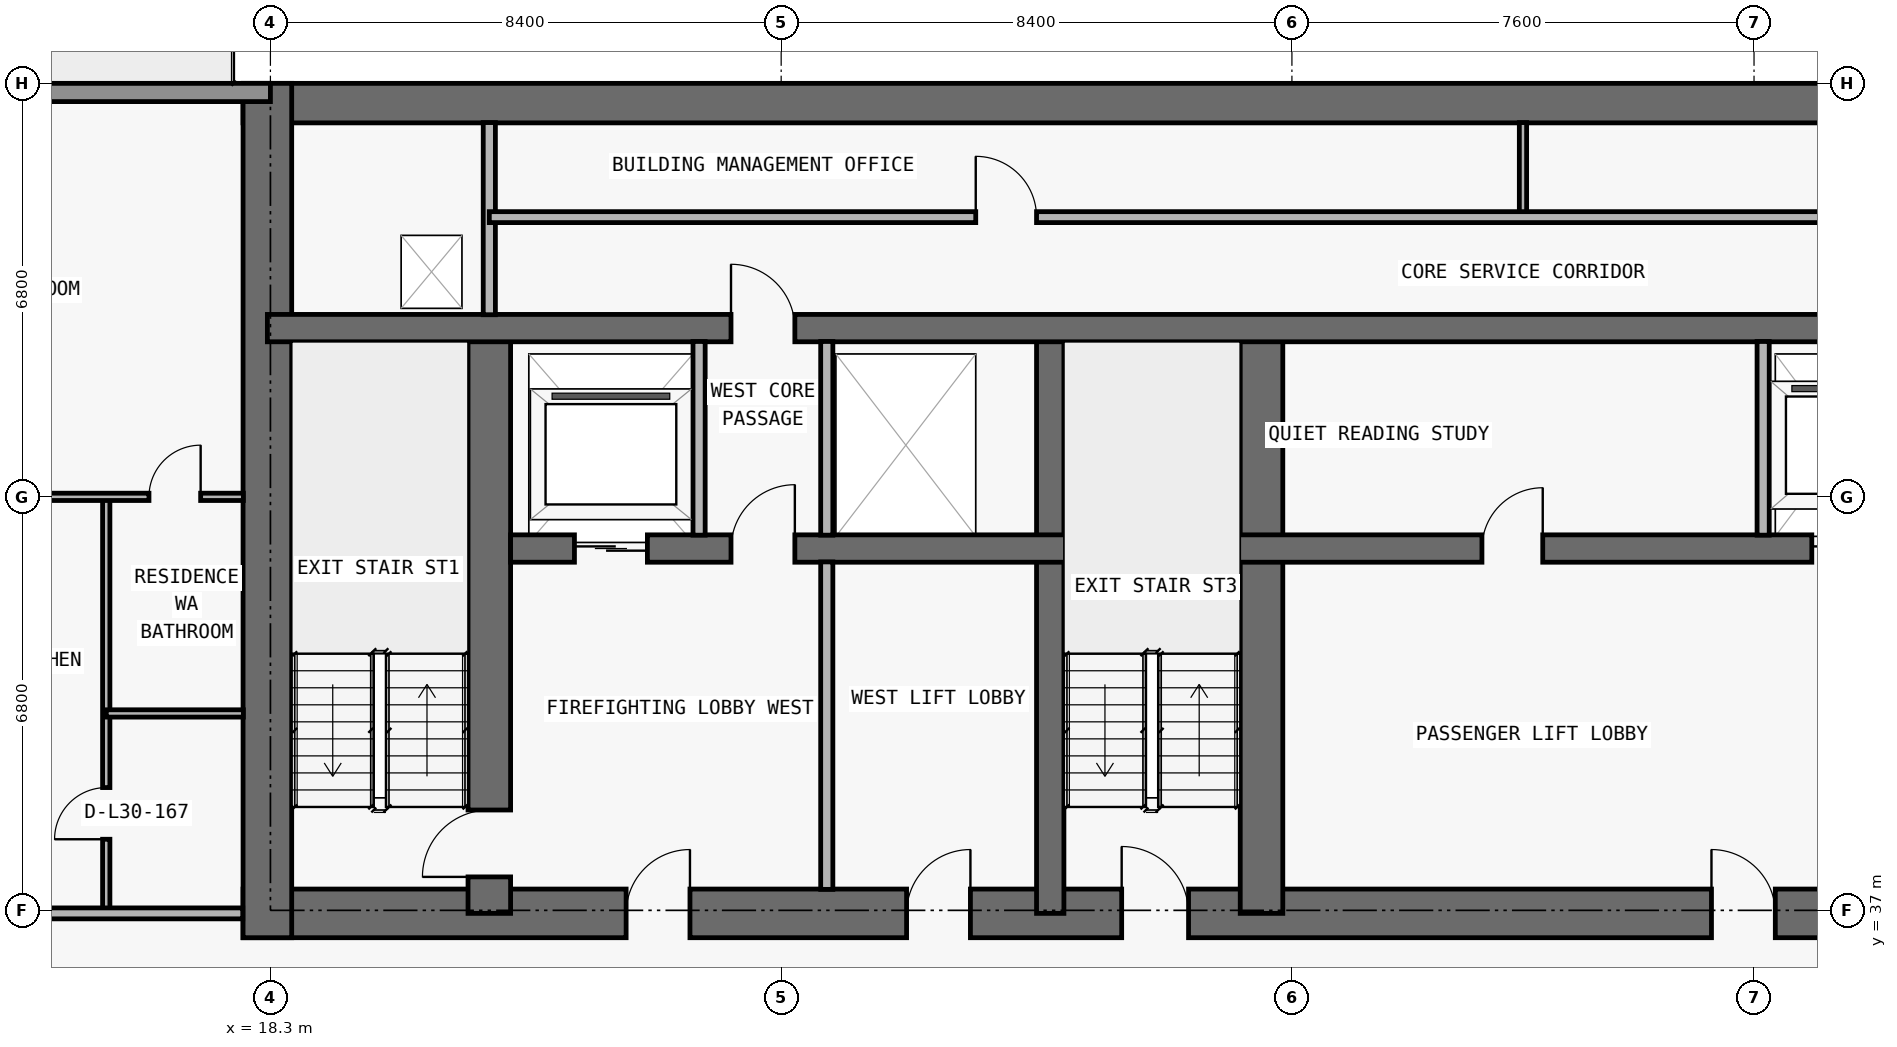
"""IFC4 building model, lengths in metres.
Left out: names, types, materials, properties, quantities, classifications, styles, units other than length and angle.
Written with IfcOpenShell. Run it as: python <this file> out.ifc"""

import sys

from ifc_helpers import new_model, si_unit, direction, frame, frame_2d, origin, place, context, subcontext, project, spatial, rectangle, extrude, element, fill, save


model = new_model("IFC4")
c1 = context("Model", 3, precision=1e-05, world=origin(), true_north=direction((0.0, 1.0)))
c2 = subcontext(c1, "Body", "Model", "MODEL_VIEW")
j1 = project(units=[si_unit("LENGTHUNIT", "METRE"), si_unit("PLANEANGLEUNIT", "RADIAN")], contexts=[c1])
p1 = place(None, origin())
s1 = spatial("IfcSite", under=j1, at=p1, CompositionType="ELEMENT")
p2 = place(p1, origin())
s2 = spatial("IfcBuilding", under=s1, at=p2, CompositionType="ELEMENT")
p3 = place(p2, frame((0.0, 0.0, 112.5)))
s3 = spatial("IfcBuildingStorey", under=s2, at=p3, CompositionType="ELEMENT", Elevation=112.5)
p4 = place(p3, frame((17.85, 36.95, 0.0), z_axis=(0.0, 0.0, 1.0), x_axis=(1.0, 0.0, 0.0)))
e1 = element("IfcWall", 1, at=p4, inside=s3, PredefinedType="SHEAR", context=c2, shape_type="SweptSolid", body=[
    extrude(rectangle(XDim=42.1, YDim=0.8, at=frame_2d((21.05, 0.0))), origin(), (0.0, 0.0, 1.0), 3.05),
])
p5 = place(p4, frame((14.45, 0.0, 0.0)))
e2 = element("IfcOpeningElement", 2, at=p5, cuts=e1, PredefinedType="OPENING", context=c2, shape_type="SweptSolid", body=[
    extrude(rectangle(XDim=1.1, YDim=2.15, at=frame_2d((0.55, 1.075))), frame((0.0, 0.41, 0.0), z_axis=(0.0, -1.0, 0.0), x_axis=(1.0, 0.0, 0.0)), (0.0, 0.0, 1.0), 0.82),
])
p6 = place(p4, frame((6.3, 0.0, 0.0)))
e3 = element("IfcOpeningElement", 3, at=p6, cuts=e1, PredefinedType="OPENING", context=c2, shape_type="SweptSolid", body=[
    extrude(rectangle(XDim=1.05, YDim=2.15, at=frame_2d((0.525, 1.075))), frame((0.0, 0.41, 0.0), z_axis=(0.0, -1.0, 0.0), x_axis=(1.0, 0.0, 0.0)), (0.0, 0.0, 1.0), 0.82),
])
p7 = place(p4, frame((34.8, 0.0, 0.0)))
e4 = element("IfcOpeningElement", 4, at=p7, cuts=e1, PredefinedType="OPENING", context=c2, shape_type="SweptSolid", body=[
    extrude(rectangle(XDim=1.05, YDim=2.15, at=frame_2d((0.525, 1.075))), frame((0.0, 0.41, 0.0), z_axis=(0.0, -1.0, 0.0), x_axis=(1.0, 0.0, 0.0)), (0.0, 0.0, 1.0), 0.82),
])
p8 = place(p4, frame((10.913, 0.0, 0.0)))
e5 = element("IfcOpeningElement", 5, at=p8, cuts=e1, PredefinedType="OPENING", context=c2, shape_type="SweptSolid", body=[
    extrude(rectangle(XDim=1.05, YDim=2.15, at=frame_2d((0.525, 1.075))), frame((0.0, 0.41, 0.0), z_axis=(0.0, -1.0, 0.0), x_axis=(1.0, 0.0, 0.0)), (0.0, 0.0, 1.0), 0.82),
])
p9 = place(p4, frame((24.15, 0.0, 0.0)))
e6 = element("IfcOpeningElement", 6, at=p9, cuts=e1, PredefinedType="OPENING", context=c2, shape_type="SweptSolid", body=[
    extrude(rectangle(XDim=1.05, YDim=2.15, at=frame_2d((0.525, 1.075))), frame((0.0, 0.41, 0.0), z_axis=(0.0, -1.0, 0.0), x_axis=(1.0, 0.0, 0.0)), (0.0, 0.0, 1.0), 0.82),
])
p10 = place(p3, frame((17.85, 50.275, 0.0), z_axis=(0.0, 0.0, 1.0), x_axis=(1.0, 0.0, 0.0)))
e7 = element("IfcWall", 7, at=p10, inside=s3, PredefinedType="SHEAR", context=c2, shape_type="SweptSolid", body=[
    extrude(rectangle(XDim=42.1, YDim=0.65, at=frame_2d((21.05, 0.0))), origin(), (0.0, 0.0, 1.0), 3.05),
])
p11 = place(p3, frame((18.25, 36.55, 0.0), z_axis=(0.0, 0.0, 1.0), x_axis=(0.0, 1.0, 0.0)))
e8 = element("IfcWall", 8, at=p11, inside=s3, PredefinedType="SHEAR", context=c2, shape_type="SweptSolid", body=[
    extrude(rectangle(XDim=14.05, YDim=0.8, at=frame_2d((7.025, 0.0))), origin(), (0.0, 0.0, 1.0), 3.05),
])
p12 = place(p3, frame((21.9, 36.95, 0.0), z_axis=(0.0, 0.0, 1.0), x_axis=(0.0, 1.0, 0.0)))
e9 = element("IfcWall", 9, at=p12, inside=s3, PredefinedType="SHEAR", context=c2, shape_type="SweptSolid", body=[
    extrude(rectangle(XDim=9.625, YDim=0.7, at=frame_2d((4.812, 0.0))), origin(), (0.0, 0.0, 1.0), 3.05),
])
p13 = place(p12, frame((0.6, 0.0, 0.0)))
e10 = element("IfcOpeningElement", 10, at=p13, cuts=e9, PredefinedType="OPENING", context=c2, shape_type="SweptSolid", body=[
    extrude(rectangle(XDim=1.1, YDim=2.15, at=frame_2d((0.55, 1.075))), frame((0.0, 0.36, 0.0), z_axis=(0.0, -1.0, 0.0), x_axis=(1.0, 0.0, 0.0)), (0.0, 0.0, 1.0), 0.72),
])
p14 = place(p3, frame((31.125, 36.95, 0.0), z_axis=(0.0, 0.0, 1.0), x_axis=(0.0, 1.0, 0.0)))
e11 = element("IfcWall", 11, at=p14, inside=s3, PredefinedType="SHEAR", context=c2, shape_type="SweptSolid", body=[
    extrude(rectangle(XDim=9.625, YDim=0.45, at=frame_2d((4.812, 0.0))), origin(), (0.0, 0.0, 1.0), 3.05),
])
p15 = place(p3, frame((34.6, 36.95, 0.0), z_axis=(0.0, 0.0, 1.0), x_axis=(0.0, 1.0, 0.0)))
e12 = element("IfcWall", 12, at=p15, inside=s3, PredefinedType="SHEAR", context=c2, shape_type="SweptSolid", body=[
    extrude(rectangle(XDim=9.625, YDim=0.7, at=frame_2d((4.812, 0.0))), origin(), (0.0, 0.0, 1.0), 3.05),
])
p16 = place(p3, frame((22.25, 42.95, 0.0), z_axis=(0.0, 0.0, 1.0), x_axis=(1.0, 0.0, 0.0)))
e13 = element("IfcWall", 13, at=p16, inside=s3, PredefinedType="SHEAR", context=c2, shape_type="SweptSolid", body=[
    extrude(rectangle(XDim=33.3, YDim=0.45, at=frame_2d((16.65, 0.0))), origin(), (0.0, 0.0, 1.0), 3.05),
])
p17 = place(p16, frame((1.05, 0.0, 0.0)))
e14 = element("IfcOpeningElement", 14, at=p17, cuts=e13, PredefinedType="OPENING", context=c2, shape_type="SweptSolid", body=[
    extrude(rectangle(XDim=1.2, YDim=2.2, at=frame_2d((0.6, 1.1))), frame((0.0, 0.235, 0.0), z_axis=(0.0, -1.0, 0.0), x_axis=(1.0, 0.0, 0.0)), (0.0, 0.0, 1.0), 0.47),
])
p18 = place(p16, frame((31.05, 0.0, 0.0)))
e15 = element("IfcOpeningElement", 15, at=p18, cuts=e13, PredefinedType="OPENING", context=c2, shape_type="SweptSolid", body=[
    extrude(rectangle(XDim=1.2, YDim=2.2, at=frame_2d((0.6, 1.1))), frame((0.0, 0.235, 0.0), z_axis=(0.0, -1.0, 0.0), x_axis=(1.0, 0.0, 0.0)), (0.0, 0.0, 1.0), 0.47),
])
p19 = place(p16, frame((21.4, 0.0, 0.0)))
e16 = element("IfcOpeningElement", 16, at=p19, cuts=e13, PredefinedType="OPENING", context=c2, shape_type="SweptSolid", body=[
    extrude(rectangle(XDim=1.1, YDim=2.2, at=frame_2d((0.55, 1.1))), frame((0.0, 0.235, 0.0), z_axis=(0.0, -1.0, 0.0), x_axis=(1.0, 0.0, 0.0)), (0.0, 0.0, 1.0), 0.47),
])
p20 = place(p16, frame((24.0, 0.0, 0.0)))
e17 = element("IfcOpeningElement", 17, at=p20, cuts=e13, PredefinedType="OPENING", context=c2, shape_type="SweptSolid", body=[
    extrude(rectangle(XDim=1.1, YDim=2.2, at=frame_2d((0.55, 1.1))), frame((0.0, 0.235, 0.0), z_axis=(0.0, -1.0, 0.0), x_axis=(1.0, 0.0, 0.0)), (0.0, 0.0, 1.0), 0.47),
])
p21 = place(p16, frame((3.625, 0.0, 0.0)))
e18 = element("IfcOpeningElement", 18, at=p21, cuts=e13, PredefinedType="OPENING", context=c2, shape_type="SweptSolid", body=[
    extrude(rectangle(XDim=1.05, YDim=2.15, at=frame_2d((0.525, 1.075))), frame((0.0, 0.235, 0.0), z_axis=(0.0, -1.0, 0.0), x_axis=(1.0, 0.0, 0.0)), (0.0, 0.0, 1.0), 0.47),
])
p22 = place(p16, frame((28.675, 0.0, 0.0)))
e19 = element("IfcOpeningElement", 19, at=p22, cuts=e13, PredefinedType="OPENING", context=c2, shape_type="SweptSolid", body=[
    extrude(rectangle(XDim=1.05, YDim=2.15, at=frame_2d((0.525, 1.075))), frame((0.0, 0.235, 0.0), z_axis=(0.0, -1.0, 0.0), x_axis=(1.0, 0.0, 0.0)), (0.0, 0.0, 1.0), 0.47),
])
p23 = place(p16, frame((15.975, 0.0, 0.0)))
e20 = element("IfcOpeningElement", 20, at=p23, cuts=e13, PredefinedType="OPENING", context=c2, shape_type="SweptSolid", body=[
    extrude(rectangle(XDim=1.0, YDim=2.2, at=frame_2d((0.5, 1.1))), frame((0.0, 0.235, 0.0), z_axis=(0.0, -1.0, 0.0), x_axis=(1.0, 0.0, 0.0)), (0.0, 0.0, 1.0), 0.47),
])
p24 = place(p3, frame((18.25, 46.575, 0.0), z_axis=(0.0, 0.0, 1.0), x_axis=(1.0, 0.0, 0.0)))
e21 = element("IfcWall", 21, at=p24, inside=s3, PredefinedType="SHEAR", context=c2, shape_type="SweptSolid", body=[
    extrude(rectangle(XDim=41.3, YDim=0.45, at=frame_2d((20.65, 0.0))), origin(), (0.0, 0.0, 1.0), 3.05),
])
p25 = place(p24, frame((7.625, 0.0, 0.0)))
e22 = element("IfcOpeningElement", 22, at=p25, cuts=e21, PredefinedType="OPENING", context=c2, shape_type="SweptSolid", body=[
    extrude(rectangle(XDim=1.05, YDim=2.15, at=frame_2d((0.525, 1.075))), frame((0.0, 0.235, 0.0), z_axis=(0.0, -1.0, 0.0), x_axis=(1.0, 0.0, 0.0)), (0.0, 0.0, 1.0), 0.47),
])
p26 = place(p24, frame((32.675, 0.0, 0.0)))
e23 = element("IfcOpeningElement", 23, at=p26, cuts=e21, PredefinedType="OPENING", context=c2, shape_type="SweptSolid", body=[
    extrude(rectangle(XDim=1.05, YDim=2.15, at=frame_2d((0.525, 1.075))), frame((0.0, 0.235, 0.0), z_axis=(0.0, -1.0, 0.0), x_axis=(1.0, 0.0, 0.0)), (0.0, 0.0, 1.0), 0.47),
])
p27 = place(p3, frame((7.7, 50.45, 0.0), z_axis=(0.0, 0.0, 1.0), x_axis=(1.0, 0.0, 0.0)))
e24 = element("IfcWall", 24, at=p27, inside=s3, PredefinedType="STANDARD", context=c2, shape_type="SweptSolid", body=[
    extrude(rectangle(XDim=10.6, YDim=0.3, at=frame_2d((5.3, 0.0))), origin(), (0.0, 0.0, 1.0), 3.05),
])
p28 = place(p27, frame((4.3, 0.0, 0.0)))
e25 = element("IfcOpeningElement", 25, at=p28, cuts=e24, PredefinedType="OPENING", context=c2, shape_type="SweptSolid", body=[
    extrude(rectangle(XDim=2.0, YDim=2.3, at=frame_2d((1.0, 1.15))), frame((0.0, 0.16, 0.0), z_axis=(0.0, -1.0, 0.0), x_axis=(1.0, 0.0, 0.0)), (0.0, 0.0, 1.0), 0.32),
])
p29 = place(p3, frame((15.6, 36.95, 0.0), z_axis=(0.0, 0.0, 1.0), x_axis=(0.0, 1.0, 0.0)))
e26 = element("IfcWall", 26, at=p29, inside=s3, PredefinedType="PARTITIONING", context=c2, shape_type="SweptSolid", body=[
    extrude(rectangle(XDim=6.85, YDim=0.12, at=frame_2d((3.425, 0.0))), origin(), (0.0, 0.0, 1.0), 3.05),
])
p30 = place(p29, frame((1.219, 0.0, 0.0)))
e27 = element("IfcOpeningElement", 27, at=p30, cuts=e26, PredefinedType="OPENING", context=c2, shape_type="SweptSolid", body=[
    extrude(rectangle(XDim=0.85, YDim=2.1, at=frame_2d((0.425, 1.05))), frame((0.0, 0.07, 0.0), z_axis=(0.0, -1.0, 0.0), x_axis=(1.0, 0.0, 0.0)), (0.0, 0.0, 1.0), 0.14),
])
p31 = place(p3, frame((21.9, 46.795, 0.0), z_axis=(0.0, 0.0, 1.0), x_axis=(0.0, 1.0, 0.0)))
e28 = element("IfcWall", 28, at=p31, inside=s3, PredefinedType="PARTITIONING", context=c2, shape_type="SweptSolid", body=[
    extrude(rectangle(XDim=3.16, YDim=0.2, at=frame_2d((1.58, 0.0))), origin(), (0.0, 0.0, 1.0), 3.05),
])
p32 = place(p3, frame((25.35, 43.17, 0.0), z_axis=(0.0, 0.0, 1.0), x_axis=(0.0, 1.0, 0.0)))
e29 = element("IfcWall", 29, at=p32, inside=s3, PredefinedType="PARTITIONING", context=c2, shape_type="SweptSolid", body=[
    extrude(rectangle(XDim=3.185, YDim=0.2, at=frame_2d((1.593, 0.0))), origin(), (0.0, 0.0, 1.0), 3.05),
])
p33 = place(p3, frame((27.45, 37.345, 0.0), z_axis=(0.0, 0.0, 1.0), x_axis=(0.0, 1.0, 0.0)))
e30 = element("IfcWall", 30, at=p33, inside=s3, PredefinedType="PARTITIONING", context=c2, shape_type="SweptSolid", body=[
    extrude(rectangle(XDim=5.385, YDim=0.2, at=frame_2d((2.692, 0.0))), origin(), (0.0, 0.0, 1.0), 3.05),
])
p34 = place(p3, frame((27.45, 43.17, 0.0), z_axis=(0.0, 0.0, 1.0), x_axis=(0.0, 1.0, 0.0)))
e31 = element("IfcWall", 31, at=p34, inside=s3, PredefinedType="PARTITIONING", context=c2, shape_type="SweptSolid", body=[
    extrude(rectangle(XDim=3.185, YDim=0.2, at=frame_2d((1.593, 0.0))), origin(), (0.0, 0.0, 1.0), 3.05),
])
p35 = place(p3, frame((38.9, 48.4, 0.0), z_axis=(0.0, 0.0, 1.0), x_axis=(0.0, 1.0, 0.0)))
e32 = element("IfcWall", 32, at=p35, inside=s3, PredefinedType="PARTITIONING", context=c2, shape_type="SweptSolid", body=[
    extrude(rectangle(XDim=1.555, YDim=0.12, at=frame_2d((0.778, 0.0))), origin(), (0.0, 0.0, 1.0), 3.05),
])
p36 = place(p3, frame((42.85, 43.17, 0.0), z_axis=(0.0, 0.0, 1.0), x_axis=(0.0, 1.0, 0.0)))
e33 = element("IfcWall", 33, at=p36, inside=s3, PredefinedType="PARTITIONING", context=c2, shape_type="SweptSolid", body=[
    extrude(rectangle(XDim=3.185, YDim=0.2, at=frame_2d((1.593, 0.0))), origin(), (0.0, 0.0, 1.0), 3.05),
])
p37 = place(p3, frame((7.7, 36.95, 0.0), z_axis=(0.0, 0.0, 1.0), x_axis=(1.0, 0.0, 0.0)))
e34 = element("IfcWall", 34, at=p37, inside=s3, PredefinedType="PARTITIONING", context=c2, shape_type="SweptSolid", body=[
    extrude(rectangle(XDim=10.145, YDim=0.18, at=frame_2d((5.073, 0.0))), origin(), (0.0, 0.0, 1.0), 3.05),
])
p38 = place(p37, frame((5.188, 0.0, 0.0)))
e35 = element("IfcOpeningElement", 35, at=p38, cuts=e34, PredefinedType="OPENING", context=c2, shape_type="SweptSolid", body=[
    extrude(rectangle(XDim=1.0, YDim=2.2, at=frame_2d((0.5, 1.1))), frame((0.0, 0.1, 0.0), z_axis=(0.0, -1.0, 0.0), x_axis=(1.0, 0.0, 0.0)), (0.0, 0.0, 1.0), 0.2),
])
p39 = place(p3, frame((15.6, 40.238, 0.0), z_axis=(0.0, 0.0, 1.0), x_axis=(1.0, 0.0, 0.0)))
e36 = element("IfcWall", 36, at=p39, inside=s3, PredefinedType="PARTITIONING", context=c2, shape_type="SweptSolid", body=[
    extrude(rectangle(XDim=2.255, YDim=0.12, at=frame_2d((1.127, 0.0))), origin(), (0.0, 0.0, 1.0), 3.05),
])
p40 = place(p3, frame((4.195, 43.8, 0.0), z_axis=(0.0, 0.0, 1.0), x_axis=(1.0, 0.0, 0.0)))
e37 = element("IfcWall", 37, at=p40, inside=s3, PredefinedType="PARTITIONING", context=c2, shape_type="SweptSolid", body=[
    extrude(rectangle(XDim=13.66, YDim=0.12, at=frame_2d((6.83, 0.0))), origin(), (0.0, 0.0, 1.0), 2.339),
])
p41 = place(p40, frame((8.743, 0.0, 0.0)))
e38 = element("IfcOpeningElement", 38, at=p41, cuts=e37, PredefinedType="OPENING", context=c2, shape_type="SweptSolid", body=[
    extrude(rectangle(XDim=0.9, YDim=2.15, at=frame_2d((0.45, 1.075))), frame((0.0, 0.07, 0.0), z_axis=(0.0, -1.0, 0.0), x_axis=(1.0, 0.0, 0.0)), (0.0, 0.0, 1.0), 0.14),
])
p42 = place(p40, frame((12.107, 0.0, 0.0)))
e39 = element("IfcOpeningElement", 39, at=p42, cuts=e37, PredefinedType="OPENING", context=c2, shape_type="SweptSolid", body=[
    extrude(rectangle(XDim=0.85, YDim=2.1, at=frame_2d((0.425, 1.05))), frame((0.0, 0.07, 0.0), z_axis=(0.0, -1.0, 0.0), x_axis=(1.0, 0.0, 0.0)), (0.0, 0.0, 1.0), 0.14),
])
p43 = place(p3, frame((21.9, 48.4, 0.0), z_axis=(0.0, 0.0, 1.0), x_axis=(1.0, 0.0, 0.0)))
e40 = element("IfcWall", 40, at=p43, inside=s3, PredefinedType="PARTITIONING", context=c2, shape_type="SweptSolid", body=[
    extrude(rectangle(XDim=34.0, YDim=0.18, at=frame_2d((17.0, 0.0))), origin(), (0.0, 0.0, 1.0), 3.05),
])
p44 = place(p43, frame((8.0, 0.0, 0.0)))
e41 = element("IfcOpeningElement", 41, at=p44, cuts=e40, PredefinedType="OPENING", context=c2, shape_type="SweptSolid", body=[
    extrude(rectangle(XDim=1.0, YDim=2.2, at=frame_2d((0.5, 1.1))), frame((0.0, 0.1, 0.0), z_axis=(0.0, -1.0, 0.0), x_axis=(1.0, 0.0, 0.0)), (0.0, 0.0, 1.0), 0.2),
])
p45 = place(p43, frame((25.0, 0.0, 0.0)))
e42 = element("IfcOpeningElement", 42, at=p45, cuts=e40, PredefinedType="OPENING", context=c2, shape_type="SweptSolid", body=[
    extrude(rectangle(XDim=1.0, YDim=2.2, at=frame_2d((0.5, 1.1))), frame((0.0, 0.1, 0.0), z_axis=(0.0, -1.0, 0.0), x_axis=(1.0, 0.0, 0.0)), (0.0, 0.0, 1.0), 0.2),
])
p46 = place(p17, origin())
e43 = element("IfcDoor", 43, at=p46, inside=s3, OperationType="DOUBLE_DOOR_SLIDING", PredefinedType="DOOR", context=c2, shape_type="SweptSolid", body=[
    extrude(rectangle(XDim=1.2, YDim=2.2, at=frame_2d((0.6, 1.1))), frame((0.0, 0.025, 0.0), z_axis=(0.0, -1.0, 0.0), x_axis=(1.0, 0.0, 0.0)), (0.0, 0.0, 1.0), 0.05),
])
fill(e14, e43)
p47 = place(p19, origin())
e44 = element("IfcDoor", 44, at=p47, inside=s3, OperationType="DOUBLE_DOOR_SLIDING", PredefinedType="DOOR", context=c2, shape_type="SweptSolid", body=[
    extrude(rectangle(XDim=1.1, YDim=2.2, at=frame_2d((0.55, 1.1))), frame((0.0, 0.025, 0.0), z_axis=(0.0, -1.0, 0.0), x_axis=(1.0, 0.0, 0.0)), (0.0, 0.0, 1.0), 0.05),
])
fill(e16, e44)
p48 = place(p5, origin())
e45 = element("IfcDoor", 45, at=p48, inside=s3, OperationType="SINGLE_SWING_LEFT", PredefinedType="DOOR", context=c2, shape_type="SweptSolid", body=[
    extrude(rectangle(XDim=1.1, YDim=2.15, at=frame_2d((0.55, 1.075))), frame((0.0, 0.025, 0.0), z_axis=(0.0, -1.0, 0.0), x_axis=(1.0, 0.0, 0.0)), (0.0, 0.0, 1.0), 0.05),
])
fill(e2, e45)
p49 = place(p6, origin())
e46 = element("IfcDoor", 46, at=p49, inside=s3, OperationType="SINGLE_SWING_RIGHT", PredefinedType="DOOR", context=c2, shape_type="SweptSolid", body=[
    extrude(rectangle(XDim=1.05, YDim=2.15, at=frame_2d((0.525, 1.075))), frame((0.0, 0.025, 0.0), z_axis=(0.0, -1.0, 0.0), x_axis=(1.0, 0.0, 0.0)), (0.0, 0.0, 1.0), 0.05),
])
fill(e3, e46)
p50 = place(p13, origin())
e47 = element("IfcDoor", 47, at=p50, inside=s3, OperationType="SINGLE_SWING_LEFT", PredefinedType="DOOR", context=c2, shape_type="SweptSolid", body=[
    extrude(rectangle(XDim=1.1, YDim=2.15, at=frame_2d((0.55, 1.075))), frame((0.0, 0.025, 0.0), z_axis=(0.0, -1.0, 0.0), x_axis=(1.0, 0.0, 0.0)), (0.0, 0.0, 1.0), 0.05),
])
fill(e10, e47)
p51 = place(p21, origin())
e48 = element("IfcDoor", 48, at=p51, inside=s3, OperationType="SINGLE_SWING_RIGHT", PredefinedType="DOOR", context=c2, shape_type="SweptSolid", body=[
    extrude(rectangle(XDim=1.05, YDim=2.15, at=frame_2d((0.525, 1.075))), frame((0.0, 0.025, 0.0), z_axis=(0.0, -1.0, 0.0), x_axis=(1.0, 0.0, 0.0)), (0.0, 0.0, 1.0), 0.05),
])
fill(e18, e48)
p52 = place(p8, origin())
e49 = element("IfcDoor", 49, at=p52, inside=s3, OperationType="SINGLE_SWING_RIGHT", PredefinedType="DOOR", context=c2, shape_type="SweptSolid", body=[
    extrude(rectangle(XDim=1.05, YDim=2.15, at=frame_2d((0.525, 1.075))), frame((0.0, 0.025, 0.0), z_axis=(0.0, -1.0, 0.0), x_axis=(1.0, 0.0, 0.0)), (0.0, 0.0, 1.0), 0.05),
])
fill(e5, e49)
p53 = place(p9, origin())
e50 = element("IfcDoor", 50, at=p53, inside=s3, OperationType="SINGLE_SWING_LEFT", PredefinedType="DOOR", context=c2, shape_type="SweptSolid", body=[
    extrude(rectangle(XDim=1.05, YDim=2.15, at=frame_2d((0.525, 1.075))), frame((0.0, 0.025, 0.0), z_axis=(0.0, -1.0, 0.0), x_axis=(1.0, 0.0, 0.0)), (0.0, 0.0, 1.0), 0.05),
])
fill(e6, e50)
p54 = place(p23, origin())
e51 = element("IfcDoor", 51, at=p54, inside=s3, OperationType="SINGLE_SWING_RIGHT", PredefinedType="DOOR", context=c2, shape_type="SweptSolid", body=[
    extrude(rectangle(XDim=1.0, YDim=2.2, at=frame_2d((0.5, 1.1))), frame((0.0, 0.025, 0.0), z_axis=(0.0, -1.0, 0.0), x_axis=(1.0, 0.0, 0.0)), (0.0, 0.0, 1.0), 0.05),
])
fill(e20, e51)
p55 = place(p25, origin())
e52 = element("IfcDoor", 52, at=p55, inside=s3, OperationType="SINGLE_SWING_LEFT", PredefinedType="DOOR", context=c2, shape_type="SweptSolid", body=[
    extrude(rectangle(XDim=1.05, YDim=2.15, at=frame_2d((0.525, 1.075))), frame((0.0, 0.025, 0.0), z_axis=(0.0, -1.0, 0.0), x_axis=(1.0, 0.0, 0.0)), (0.0, 0.0, 1.0), 0.05),
])
fill(e22, e52)
p56 = place(p44, origin())
e53 = element("IfcDoor", 53, at=p56, inside=s3, OperationType="SINGLE_SWING_LEFT", PredefinedType="DOOR", context=c2, shape_type="SweptSolid", body=[
    extrude(rectangle(XDim=1.0, YDim=2.2, at=frame_2d((0.5, 1.1))), frame((0.0, 0.025, 0.0), z_axis=(0.0, -1.0, 0.0), x_axis=(1.0, 0.0, 0.0)), (0.0, 0.0, 1.0), 0.05),
])
fill(e41, e53)
p57 = place(p30, origin())
e54 = element("IfcDoor", 54, at=p57, inside=s3, OperationType="SINGLE_SWING_LEFT", PredefinedType="DOOR", context=c2, shape_type="SweptSolid", body=[
    extrude(rectangle(XDim=0.85, YDim=2.1, at=frame_2d((0.425, 1.05))), frame((0.0, 0.025, 0.0), z_axis=(0.0, -1.0, 0.0), x_axis=(1.0, 0.0, 0.0)), (0.0, 0.0, 1.0), 0.05),
])
fill(e27, e54)
p58 = place(p42, origin())
e55 = element("IfcDoor", 55, at=p58, inside=s3, OperationType="SINGLE_SWING_RIGHT", PredefinedType="DOOR", context=c2, shape_type="SweptSolid", body=[
    extrude(rectangle(XDim=0.85, YDim=2.1, at=frame_2d((0.425, 1.05))), frame((0.0, 0.025, 0.0), z_axis=(0.0, -1.0, 0.0), x_axis=(1.0, 0.0, 0.0)), (0.0, 0.0, 1.0), 0.05),
])
fill(e39, e55)
save(model, sys.argv[1])
